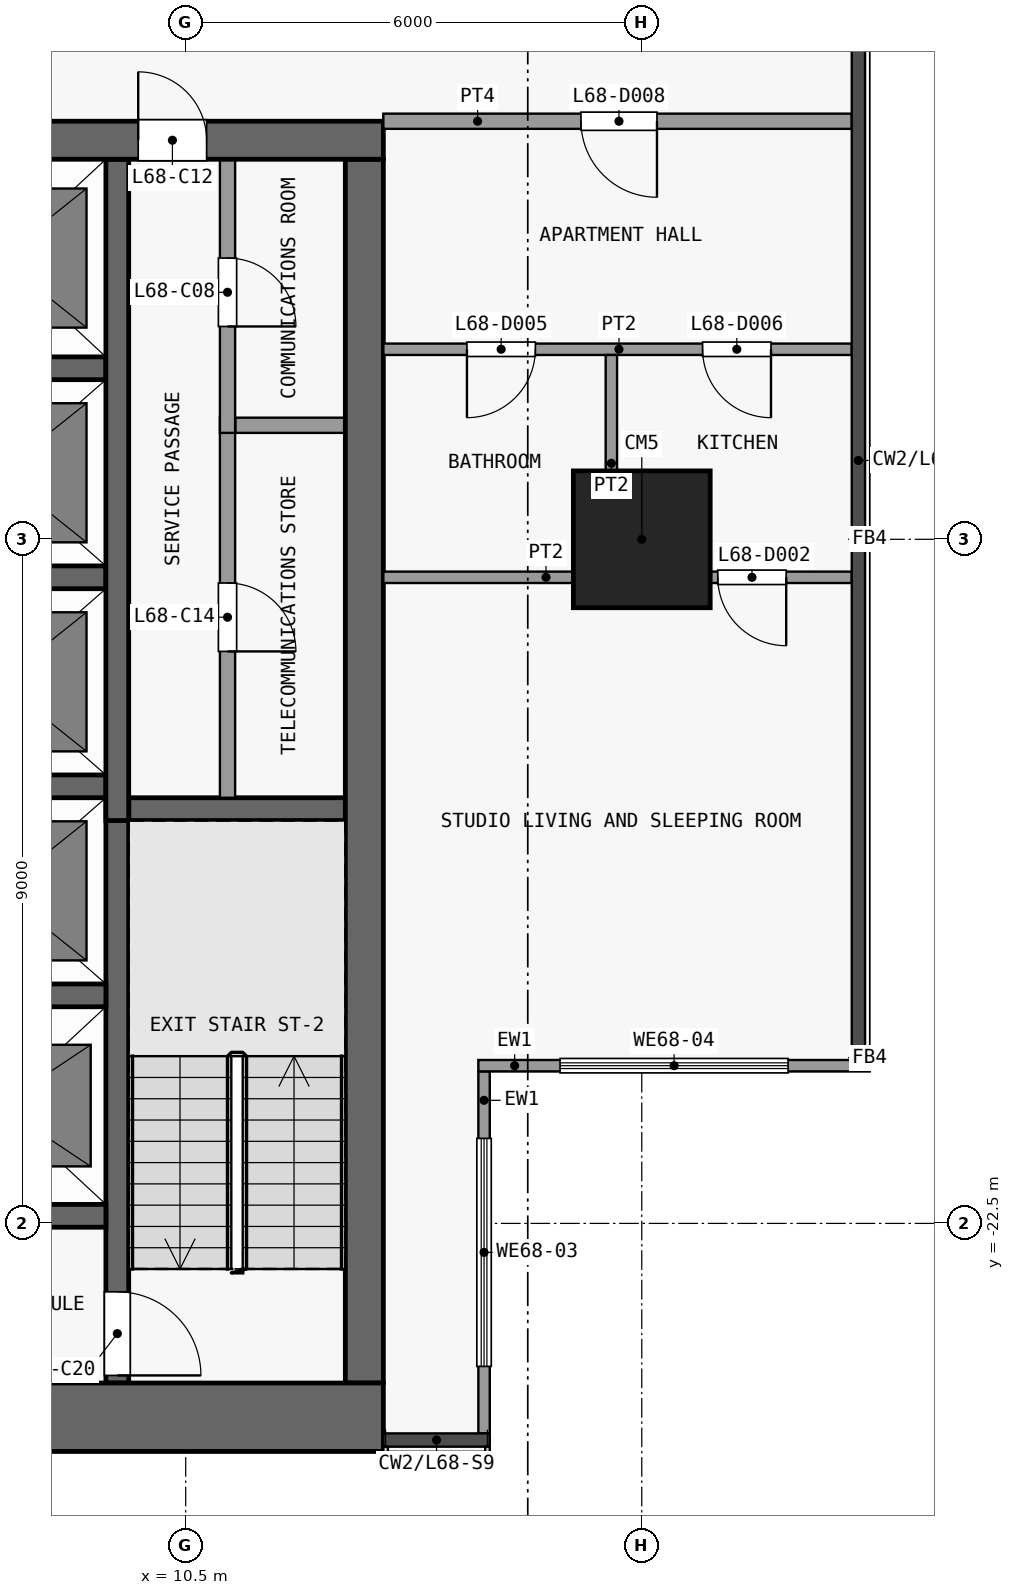
"""IFC4 building model, lengths in metres.
Left out: names, types, materials, properties, quantities, classifications, styles, units other than length and angle.
Written with IfcOpenShell. Run it as: python <this file> out.ifc"""

import sys

from ifc_helpers import new_model, si_unit, direction, frame, frame_2d, origin, origin_2d, place, context, subcontext, project, spatial, rectangle, extrude, element, fill, save


model = new_model("IFC4")
c1 = context("Model", 3, precision=1e-05, world=origin(), true_north=direction((0.0, 1.0)))
c2 = subcontext(c1, "Body", "Model", "MODEL_VIEW")
j1 = project(units=[si_unit("LENGTHUNIT", "METRE"), si_unit("PLANEANGLEUNIT", "RADIAN")], contexts=[c1])
p1 = place(None, origin())
s1 = spatial("IfcSite", under=j1, at=p1, CompositionType="ELEMENT")
p2 = place(p1, origin())
s2 = spatial("IfcBuilding", under=s1, at=p2, CompositionType="ELEMENT")
p3 = place(p2, frame((0.0, 0.0, 269.9)))
s3 = spatial("IfcBuildingStorey", under=s2, at=p3, CompositionType="ELEMENT", Elevation=269.9)
p4 = place(p3, frame((16.5, -13.5, 0.0), z_axis=(0.0, 0.0, 1.0), x_axis=(1.0, 0.0, 0.0)))
e1 = element("IfcColumn", 1, at=p4, inside=s3, PredefinedType="COLUMN", context=c2, shape_type="SweptSolid", body=[
    extrude(rectangle(XDim=1.8, YDim=1.8, at=origin_2d()), origin(), (0.0, 0.0, 1.0), 3.6),
])
p5 = place(p3, frame((-13.1, -25.05, 0.0), z_axis=(0.0, 0.0, 1.0), x_axis=(1.0, 0.0, 0.0)))
e2 = element("IfcWall", 2, at=p5, inside=s3, PredefinedType="SHEAR", context=c2, shape_type="SweptSolid", body=[
    extrude(rectangle(XDim=26.2, YDim=0.9, at=frame_2d((13.1, 0.0))), origin(), (0.0, 0.0, 1.0), 3.3),
])
p6 = place(p3, frame((-13.1, -8.25, 0.0), z_axis=(0.0, 0.0, 1.0), x_axis=(1.0, 0.0, 0.0)))
e3 = element("IfcWall", 3, at=p6, inside=s3, PredefinedType="SHEAR", context=c2, shape_type="SweptSolid", body=[
    extrude(rectangle(XDim=26.2, YDim=0.5, at=frame_2d((13.1, 0.0))), origin(), (0.0, 0.0, 1.0), 3.3),
])
p7 = place(p6, frame((7.4, 0.0, 0.0)))
e4 = element("IfcOpeningElement", 4, at=p7, cuts=e3, PredefinedType="OPENING", context=c2, shape_type="SweptSolid", body=[
    extrude(rectangle(XDim=1.8, YDim=2.1, at=frame_2d((0.9, 1.05))), frame((0.0, 0.26, 0.0), z_axis=(0.0, -1.0, 0.0), x_axis=(1.0, 0.0, 0.0)), (0.0, 0.0, 1.0), 0.52),
])
p8 = place(p6, frame((17.0, 0.0, 0.0)))
e5 = element("IfcOpeningElement", 5, at=p8, cuts=e3, PredefinedType="OPENING", context=c2, shape_type="SweptSolid", body=[
    extrude(rectangle(XDim=1.8, YDim=2.1, at=frame_2d((0.9, 1.05))), frame((0.0, 0.26, 0.0), z_axis=(0.0, -1.0, 0.0), x_axis=(1.0, 0.0, 0.0)), (0.0, 0.0, 1.0), 0.52),
])
p9 = place(p6, frame((2.325, 0.0, 0.0)))
e6 = element("IfcOpeningElement", 6, at=p9, cuts=e3, PredefinedType="OPENING", context=c2, shape_type="SweptSolid", body=[
    extrude(rectangle(XDim=0.9, YDim=2.1, at=frame_2d((0.45, 1.05))), frame((0.0, 0.26, 0.0), z_axis=(0.0, -1.0, 0.0), x_axis=(1.0, 0.0, 0.0)), (0.0, 0.0, 1.0), 0.52),
])
p10 = place(p6, frame((22.975, 0.0, 0.0)))
e7 = element("IfcOpeningElement", 7, at=p10, cuts=e3, PredefinedType="OPENING", context=c2, shape_type="SweptSolid", body=[
    extrude(rectangle(XDim=0.9, YDim=2.1, at=frame_2d((0.45, 1.05))), frame((0.0, 0.26, 0.0), z_axis=(0.0, -1.0, 0.0), x_axis=(1.0, 0.0, 0.0)), (0.0, 0.0, 1.0), 0.52),
])
p11 = place(p3, frame((12.85, -24.6, 0.0), z_axis=(0.0, 0.0, 1.0), x_axis=(0.0, 1.0, 0.0)))
e8 = element("IfcWall", 8, at=p11, inside=s3, PredefinedType="SHEAR", context=c2, shape_type="SweptSolid", body=[
    extrude(rectangle(XDim=16.1, YDim=0.5, at=frame_2d((8.05, 0.0))), origin(), (0.0, 0.0, 1.0), 3.3),
])
for number, where, z_axis, x_axis in (
    (9, (6.65, -22.4, 0.0), (0.0, 0.0, 1.0), (1.0, 0.0, 0.0)),
    (10, (6.65, -19.5, 0.0), (0.0, 0.0, 1.0), (1.0, 0.0, 0.0)),
):
    element("IfcWall", number, at=place(p3, frame(where, z_axis=z_axis, x_axis=x_axis)), inside=s3, PredefinedType="SHEAR", context=c2, shape_type="SweptSolid", body=[
        extrude(rectangle(XDim=2.8, YDim=0.3, at=frame_2d((1.4, 0.0))), origin(), (0.0, 0.0, 1.0), 3.3),
    ])
p12 = place(p3, frame((9.75, -17.05, 0.0), z_axis=(0.0, 0.0, 1.0), x_axis=(1.0, 0.0, 0.0)))
e11 = element("IfcWall", 11, at=p12, inside=s3, PredefinedType="SHEAR", context=c2, shape_type="SweptSolid", body=[
    extrude(rectangle(XDim=2.85, YDim=0.3, at=frame_2d((1.425, 0.0))), origin(), (0.0, 0.0, 1.0), 3.3),
])
for number, where, z_axis, x_axis in (
    (12, (6.65, -16.75, 0.0), (0.0, 0.0, 1.0), (1.0, 0.0, 0.0)),
    (13, (6.65, -14.0, 0.0), (0.0, 0.0, 1.0), (1.0, 0.0, 0.0)),
):
    element("IfcWall", number, at=place(p3, frame(where, z_axis=z_axis, x_axis=x_axis)), inside=s3, PredefinedType="SHEAR", context=c2, shape_type="SweptSolid", body=[
        extrude(rectangle(XDim=2.8, YDim=0.3, at=frame_2d((1.4, 0.0))), origin(), (0.0, 0.0, 1.0), 3.3),
    ])
p13 = place(p3, frame((11.15, -12.0, 0.0), z_axis=(0.0, 0.0, 1.0), x_axis=(1.0, 0.0, 0.0)))
e14 = element("IfcWall", 14, at=p13, inside=s3, PredefinedType="PARTITIONING", context=c2, shape_type="SweptSolid", body=[
    extrude(rectangle(XDim=1.45, YDim=0.2, at=frame_2d((0.725, 0.0))), origin(), (0.0, 0.0, 1.0), 3.3),
])
p14 = place(p3, frame((6.65, -11.25, 0.0), z_axis=(0.0, 0.0, 1.0), x_axis=(1.0, 0.0, 0.0)))
e15 = element("IfcWall", 15, at=p14, inside=s3, PredefinedType="SHEAR", context=c2, shape_type="SweptSolid", body=[
    extrude(rectangle(XDim=2.8, YDim=0.3, at=frame_2d((1.4, 0.0))), origin(), (0.0, 0.0, 1.0), 3.3),
])
p15 = place(p3, frame((9.6, -16.9, 0.0), z_axis=(0.0, 0.0, 1.0), x_axis=(0.0, -1.0, 0.0)))
e16 = element("IfcWall", 16, at=p15, inside=s3, PredefinedType="SHEAR", context=c2, shape_type="SweptSolid", body=[
    extrude(rectangle(XDim=7.7, YDim=0.3, at=frame_2d((3.85, 0.0))), origin(), (0.0, 0.0, 1.0), 3.3),
])
p16 = place(p15, frame((6.5, 0.0, 0.0)))
e17 = element("IfcOpeningElement", 17, at=p16, cuts=e16, PredefinedType="OPENING", context=c2, shape_type="SweptSolid", body=[
    extrude(rectangle(XDim=1.1, YDim=2.1, at=frame_2d((0.55, 1.05))), frame((0.0, 0.16, 0.0), z_axis=(0.0, -1.0, 0.0), x_axis=(1.0, 0.0, 0.0)), (0.0, 0.0, 1.0), 0.32),
])
p17 = place(p3, frame((9.6, -17.2, 0.0), z_axis=(0.0, 0.0, 1.0), x_axis=(0.0, 1.0, 0.0)))
e18 = element("IfcWall", 18, at=p17, inside=s3, PredefinedType="SHEAR", context=c2, shape_type="SweptSolid", body=[
    extrude(rectangle(XDim=8.7, YDim=0.3, at=frame_2d((4.35, 0.0))), origin(), (0.0, 0.0, 1.0), 3.3),
])
p18 = place(p3, frame((11.05, -11.9, 0.0), z_axis=(0.0, 0.0, 1.0), x_axis=(0.0, -1.0, 0.0)))
e19 = element("IfcWall", 19, at=p18, inside=s3, PredefinedType="PARTITIONING", context=c2, shape_type="SweptSolid", body=[
    extrude(rectangle(XDim=5.0, YDim=0.2, at=frame_2d((2.5, 0.0))), origin(), (0.0, 0.0, 1.0), 3.3),
])
p19 = place(p18, frame((2.175, 0.0, 0.0)))
e20 = element("IfcOpeningElement", 20, at=p19, cuts=e19, PredefinedType="OPENING", context=c2, shape_type="SweptSolid", body=[
    extrude(rectangle(XDim=0.9, YDim=2.1, at=frame_2d((0.45, 1.05))), frame((0.0, 0.11, 0.0), z_axis=(0.0, -1.0, 0.0), x_axis=(1.0, 0.0, 0.0)), (0.0, 0.0, 1.0), 0.22),
])
p20 = place(p3, frame((11.05, -8.5, 0.0), z_axis=(0.0, 0.0, 1.0), x_axis=(0.0, -1.0, 0.0)))
e21 = element("IfcWall", 21, at=p20, inside=s3, PredefinedType="PARTITIONING", context=c2, shape_type="SweptSolid", body=[
    extrude(rectangle(XDim=3.6, YDim=0.2, at=frame_2d((1.8, 0.0))), origin(), (0.0, 0.0, 1.0), 3.3),
])
p21 = place(p20, frame((1.3, 0.0, 0.0)))
e22 = element("IfcOpeningElement", 22, at=p21, cuts=e21, PredefinedType="OPENING", context=c2, shape_type="SweptSolid", body=[
    extrude(rectangle(XDim=0.9, YDim=2.1, at=frame_2d((0.45, 1.05))), frame((0.0, 0.11, 0.0), z_axis=(0.0, -1.0, 0.0), x_axis=(1.0, 0.0, 0.0)), (0.0, 0.0, 1.0), 0.22),
])
p22 = place(p3, frame((14.425, -20.5, 0.0), z_axis=(0.0, 0.0, 1.0), x_axis=(0.0, -1.0, 0.0)))
e23 = element("IfcWall", 23, at=p22, inside=s3, PredefinedType="SOLIDWALL", context=c2, shape_type="SweptSolid", body=[
    extrude(rectangle(XDim=4.762, YDim=0.15, at=frame_2d((2.381, 0.0))), origin(), (0.0, 0.0, 1.0), 3.3),
])
p23 = place(p22, frame((0.881, 0.0, 0.9)))
e24 = element("IfcOpeningElement", 24, at=p23, cuts=e23, PredefinedType="OPENING", context=c2, shape_type="SweptSolid", body=[
    extrude(rectangle(XDim=3.0, YDim=2.4, at=frame_2d((1.5, 1.2))), frame((0.0, 0.085, 0.0), z_axis=(0.0, -1.0, 0.0), x_axis=(1.0, 0.0, 0.0)), (0.0, 0.0, 1.0), 0.17),
])
p24 = place(p3, frame((19.5, -20.425, 0.0), z_axis=(0.0, 0.0, 1.0), x_axis=(-1.0, 0.0, 0.0)))
e25 = element("IfcWall", 25, at=p24, inside=s3, PredefinedType="SOLIDWALL", context=c2, shape_type="SweptSolid", body=[
    extrude(rectangle(XDim=5.15, YDim=0.15, at=frame_2d((2.575, 0.0))), origin(), (0.0, 0.0, 1.0), 3.3),
])
p25 = place(p24, frame((1.075, 0.0, 0.9)))
e26 = element("IfcOpeningElement", 26, at=p25, cuts=e25, PredefinedType="OPENING", context=c2, shape_type="SweptSolid", body=[
    extrude(rectangle(XDim=3.0, YDim=2.4, at=frame_2d((1.5, 1.2))), frame((0.0, 0.085, 0.0), z_axis=(0.0, -1.0, 0.0), x_axis=(1.0, 0.0, 0.0)), (0.0, 0.0, 1.0), 0.17),
])
p26 = place(p3, frame((13.1, -14.0, 0.0), z_axis=(0.0, 0.0, 1.0), x_axis=(1.0, 0.0, 0.0)))
e27 = element("IfcWall", 27, at=p26, inside=s3, PredefinedType="PARTITIONING", context=c2, shape_type="SweptSolid", body=[
    extrude(rectangle(XDim=6.162, YDim=0.15, at=frame_2d((3.081, 0.0))), origin(), (0.0, 0.0, 1.0), 3.3),
])
p27 = place(p26, frame((4.4, 0.0, 0.0)))
e28 = element("IfcOpeningElement", 28, at=p27, cuts=e27, PredefinedType="OPENING", context=c2, shape_type="SweptSolid", body=[
    extrude(rectangle(XDim=0.9, YDim=2.1, at=frame_2d((0.45, 1.05))), frame((0.0, 0.085, 0.0), z_axis=(0.0, -1.0, 0.0), x_axis=(1.0, 0.0, 0.0)), (0.0, 0.0, 1.0), 0.17),
])
p28 = place(p3, frame((13.1, -11.0, 0.0), z_axis=(0.0, 0.0, 1.0), x_axis=(1.0, 0.0, 0.0)))
e29 = element("IfcWall", 29, at=p28, inside=s3, PredefinedType="PARTITIONING", context=c2, shape_type="SweptSolid", body=[
    extrude(rectangle(XDim=6.162, YDim=0.15, at=frame_2d((3.081, 0.0))), origin(), (0.0, 0.0, 1.0), 3.3),
])
p29 = place(p28, frame((1.1, 0.0, 0.0)))
e30 = element("IfcOpeningElement", 30, at=p29, cuts=e29, PredefinedType="OPENING", context=c2, shape_type="SweptSolid", body=[
    extrude(rectangle(XDim=0.9, YDim=2.1, at=frame_2d((0.45, 1.05))), frame((0.0, 0.085, 0.0), z_axis=(0.0, -1.0, 0.0), x_axis=(1.0, 0.0, 0.0)), (0.0, 0.0, 1.0), 0.17),
])
p30 = place(p28, frame((4.2, 0.0, 0.0)))
e31 = element("IfcOpeningElement", 31, at=p30, cuts=e29, PredefinedType="OPENING", context=c2, shape_type="SweptSolid", body=[
    extrude(rectangle(XDim=0.9, YDim=2.1, at=frame_2d((0.45, 1.05))), frame((0.0, 0.085, 0.0), z_axis=(0.0, -1.0, 0.0), x_axis=(1.0, 0.0, 0.0)), (0.0, 0.0, 1.0), 0.17),
])
p31 = place(p3, frame((13.1, -8.0, 0.0), z_axis=(0.0, 0.0, 1.0), x_axis=(1.0, 0.0, 0.0)))
e32 = element("IfcWall", 32, at=p31, inside=s3, PredefinedType="PARTITIONING", context=c2, shape_type="SweptSolid", body=[
    extrude(rectangle(XDim=6.162, YDim=0.2, at=frame_2d((3.081, 0.0))), origin(), (0.0, 0.0, 1.0), 3.3),
])
p32 = place(p31, frame((2.6, 0.0, 0.0)))
e33 = element("IfcOpeningElement", 33, at=p32, cuts=e32, PredefinedType="OPENING", context=c2, shape_type="SweptSolid", body=[
    extrude(rectangle(XDim=1.0, YDim=2.1, at=frame_2d((0.5, 1.05))), frame((0.0, 0.11, 0.0), z_axis=(0.0, -1.0, 0.0), x_axis=(1.0, 0.0, 0.0)), (0.0, 0.0, 1.0), 0.22),
])
p33 = place(p3, frame((16.1, -13.925, 0.0), z_axis=(0.0, 0.0, 1.0), x_axis=(0.0, 1.0, 0.0)))
e34 = element("IfcWall", 34, at=p33, inside=s3, PredefinedType="PARTITIONING", context=c2, shape_type="SweptSolid", body=[
    extrude(rectangle(XDim=2.85, YDim=0.15, at=frame_2d((1.425, 0.0))), origin(), (0.0, 0.0, 1.0), 3.3),
])
p34 = place(p21, origin())
e35 = element("IfcDoor", 35, at=p34, inside=s3, OperationType="SINGLE_SWING_RIGHT", PredefinedType="DOOR", context=c2, shape_type="SweptSolid", body=[
    extrude(rectangle(XDim=0.9, YDim=2.1, at=frame_2d((0.45, 1.05))), frame((0.0, 0.025, 0.0), z_axis=(0.0, -1.0, 0.0), x_axis=(1.0, 0.0, 0.0)), (0.0, 0.0, 1.0), 0.05),
])
fill(e22, e35)
p35 = place(p10, origin())
e36 = element("IfcDoor", 36, at=p35, inside=s3, OperationType="SINGLE_SWING_LEFT", PredefinedType="DOOR", context=c2, shape_type="SweptSolid", body=[
    extrude(rectangle(XDim=0.9, YDim=2.1, at=frame_2d((0.45, 1.05))), frame((0.0, 0.025, 0.0), z_axis=(0.0, -1.0, 0.0), x_axis=(1.0, 0.0, 0.0)), (0.0, 0.0, 1.0), 0.05),
])
fill(e7, e36)
p36 = place(p19, origin())
e37 = element("IfcDoor", 37, at=p36, inside=s3, OperationType="SINGLE_SWING_RIGHT", PredefinedType="DOOR", context=c2, shape_type="SweptSolid", body=[
    extrude(rectangle(XDim=0.9, YDim=2.1, at=frame_2d((0.45, 1.05))), frame((0.0, 0.025, 0.0), z_axis=(0.0, -1.0, 0.0), x_axis=(1.0, 0.0, 0.0)), (0.0, 0.0, 1.0), 0.05),
])
fill(e20, e37)
p37 = place(p16, origin())
e38 = element("IfcDoor", 38, at=p37, inside=s3, OperationType="SINGLE_SWING_RIGHT", PredefinedType="DOOR", context=c2, shape_type="SweptSolid", body=[
    extrude(rectangle(XDim=1.1, YDim=2.1, at=frame_2d((0.55, 1.05))), frame((0.0, 0.025, 0.0), z_axis=(0.0, -1.0, 0.0), x_axis=(1.0, 0.0, 0.0)), (0.0, 0.0, 1.0), 0.05),
])
fill(e17, e38)
p38 = place(p23, origin())
e39 = element("IfcWindow", 39, at=p38, inside=s3, PartitioningType="SINGLE_PANEL", PredefinedType="WINDOW", context=c2, shape_type="SweptSolid", body=[
    extrude(rectangle(XDim=3.0, YDim=2.4, at=frame_2d((1.5, 1.2))), frame((0.0, 0.03, 0.0), z_axis=(0.0, -1.0, 0.0), x_axis=(1.0, 0.0, 0.0)), (0.0, 0.0, 1.0), 0.06),
])
fill(e24, e39)
p39 = place(p25, origin())
e40 = element("IfcWindow", 40, at=p39, inside=s3, PartitioningType="SINGLE_PANEL", PredefinedType="WINDOW", context=c2, shape_type="SweptSolid", body=[
    extrude(rectangle(XDim=3.0, YDim=2.4, at=frame_2d((1.5, 1.2))), frame((0.0, 0.03, 0.0), z_axis=(0.0, -1.0, 0.0), x_axis=(1.0, 0.0, 0.0)), (0.0, 0.0, 1.0), 0.06),
])
fill(e26, e40)
p40 = place(p27, origin())
e41 = element("IfcDoor", 41, at=p40, inside=s3, OperationType="SINGLE_SWING_RIGHT", PredefinedType="DOOR", context=c2, shape_type="SweptSolid", body=[
    extrude(rectangle(XDim=0.9, YDim=2.1, at=frame_2d((0.45, 1.05))), frame((0.0, 0.025, 0.0), z_axis=(0.0, -1.0, 0.0), x_axis=(1.0, 0.0, 0.0)), (0.0, 0.0, 1.0), 0.05),
])
fill(e28, e41)
p41 = place(p29, origin())
e42 = element("IfcDoor", 42, at=p41, inside=s3, OperationType="SINGLE_SWING_LEFT", PredefinedType="DOOR", context=c2, shape_type="SweptSolid", body=[
    extrude(rectangle(XDim=0.9, YDim=2.1, at=frame_2d((0.45, 1.05))), frame((0.0, 0.025, 0.0), z_axis=(0.0, -1.0, 0.0), x_axis=(1.0, 0.0, 0.0)), (0.0, 0.0, 1.0), 0.05),
])
fill(e30, e42)
p42 = place(p30, origin())
e43 = element("IfcDoor", 43, at=p42, inside=s3, OperationType="SINGLE_SWING_RIGHT", PredefinedType="DOOR", context=c2, shape_type="SweptSolid", body=[
    extrude(rectangle(XDim=0.9, YDim=2.1, at=frame_2d((0.45, 1.05))), frame((0.0, 0.025, 0.0), z_axis=(0.0, -1.0, 0.0), x_axis=(1.0, 0.0, 0.0)), (0.0, 0.0, 1.0), 0.05),
])
fill(e31, e43)
p43 = place(p32, origin())
e44 = element("IfcDoor", 44, at=p43, inside=s3, OperationType="SINGLE_SWING_RIGHT", PredefinedType="DOOR", context=c2, shape_type="SweptSolid", body=[
    extrude(rectangle(XDim=1.0, YDim=2.1, at=frame_2d((0.5, 1.05))), frame((0.0, 0.025, 0.0), z_axis=(0.0, -1.0, 0.0), x_axis=(1.0, 0.0, 0.0)), (0.0, 0.0, 1.0), 0.05),
])
fill(e33, e44)
save(model, sys.argv[1])
